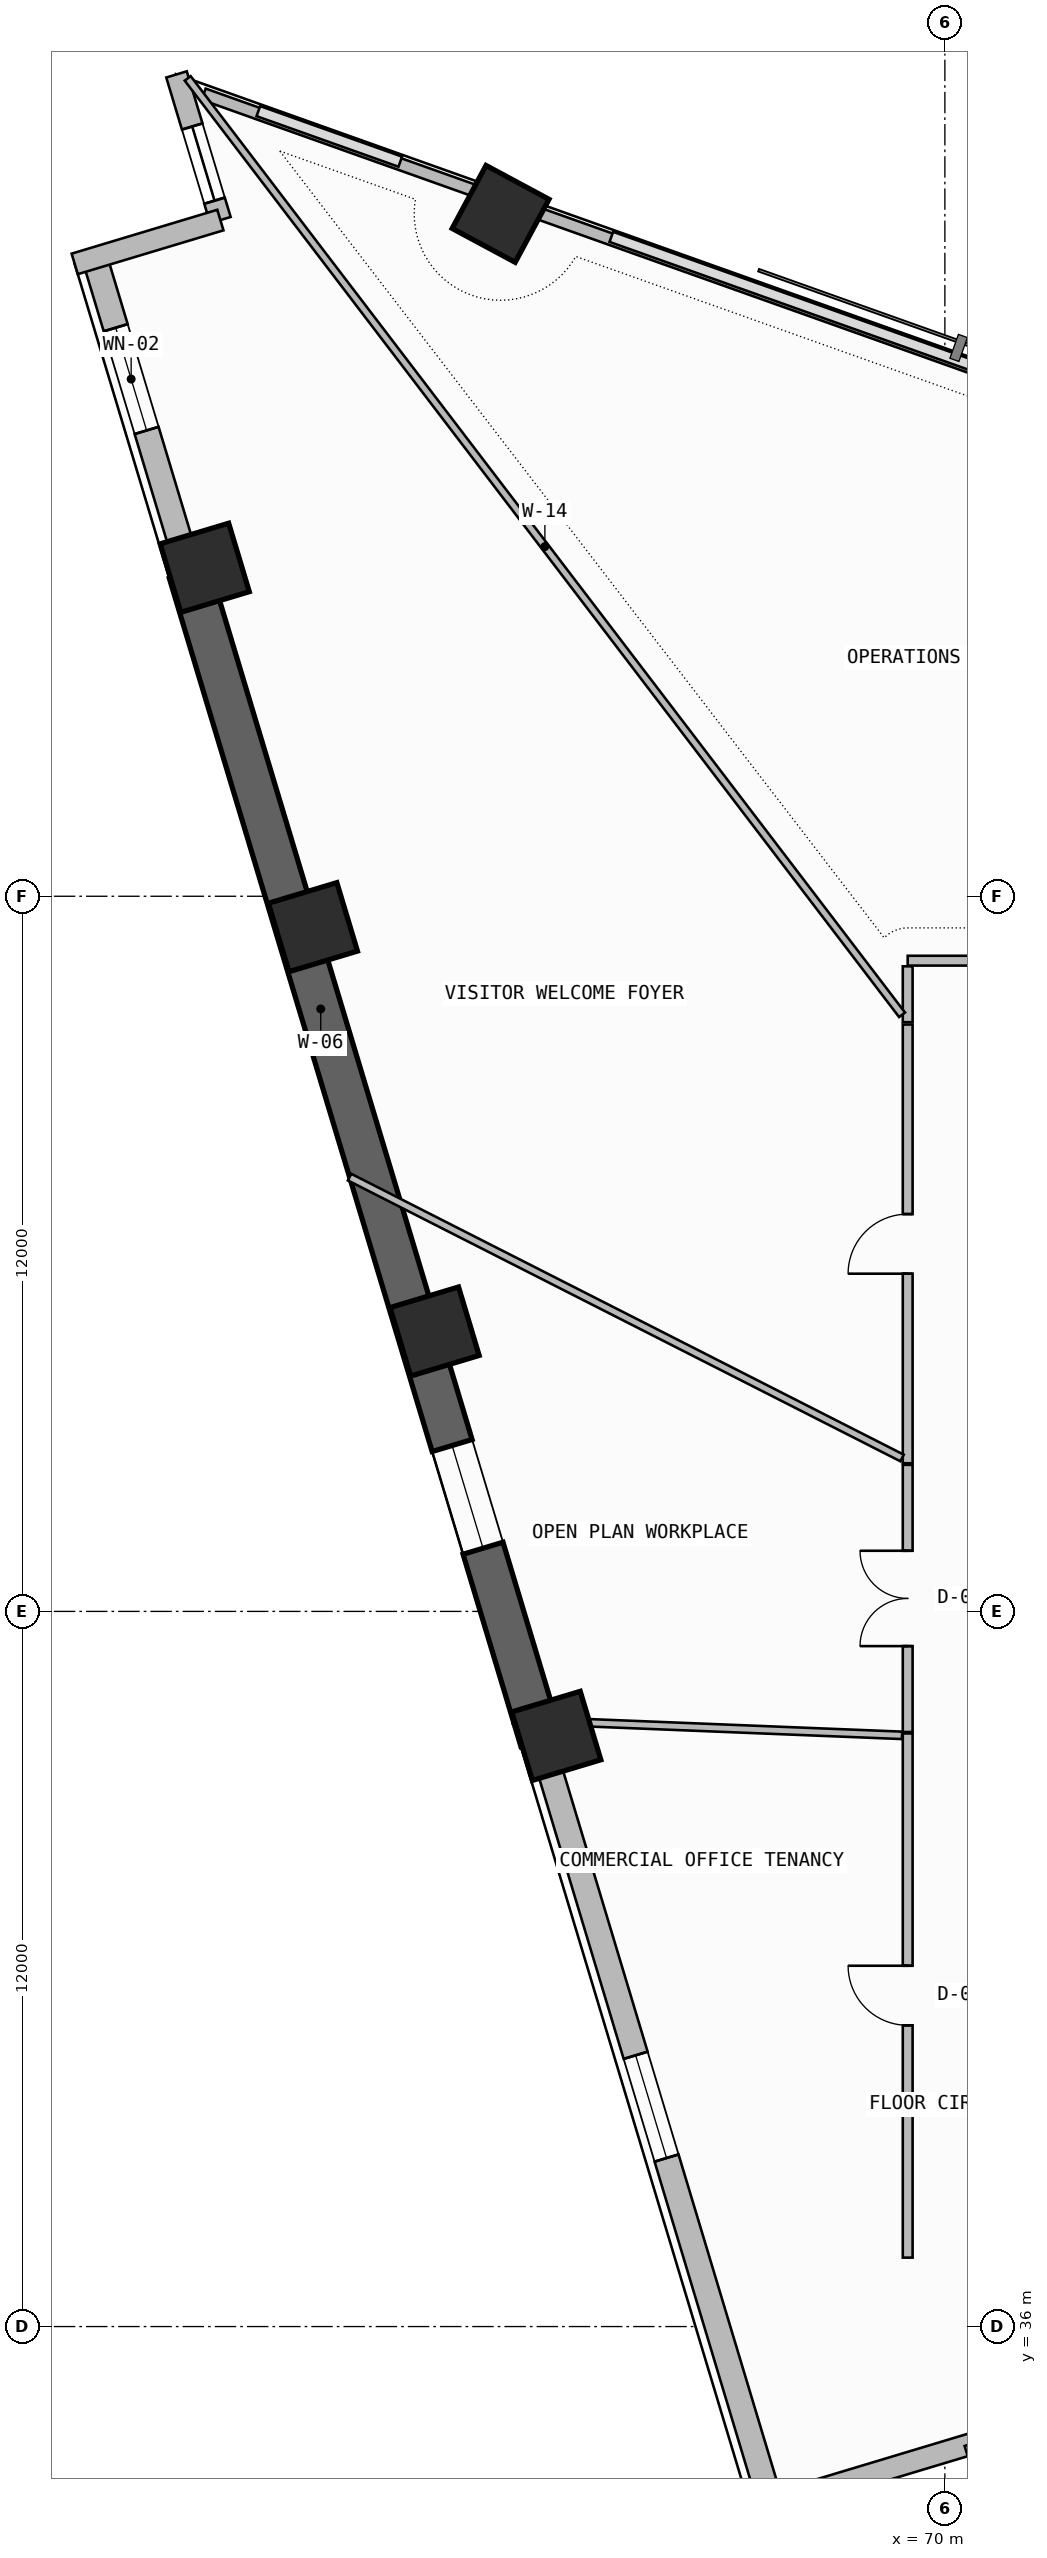
"""IFC4 building model, lengths in metres.
Left out: names, types, materials, properties, quantities, classifications, styles, units other than length and angle.
Written with IfcOpenShell. Run it as: python <this file> out.ifc"""

import sys

from ifc_helpers import new_model, si_unit, direction, frame, frame_2d, origin, origin_2d, place, context, subcontext, project, spatial, rectangle, extrude, element, fill, save


model = new_model("IFC4")
c1 = context("Model", 3, precision=1e-05, world=origin(), true_north=direction((0.0, 1.0)))
c2 = subcontext(c1, "Body", "Model", "MODEL_VIEW")
j1 = project(units=[si_unit("LENGTHUNIT", "METRE"), si_unit("PLANEANGLEUNIT", "RADIAN")], contexts=[c1])
p1 = place(None, origin())
s1 = spatial("IfcSite", under=j1, at=p1, CompositionType="ELEMENT")
p2 = place(p1, origin())
s2 = spatial("IfcBuilding", under=s1, at=p2, CompositionType="ELEMENT")
p3 = place(p2, frame((0.0, 0.0, 150.3)))
s3 = spatial("IfcBuildingStorey", under=s2, at=p3, CompositionType="ELEMENT", Elevation=150.3)
for number, where, z_axis, x_axis in (
    (1, (62.545, 71.45, 0.0), (0.0, 0.0, 1.0), (0.473, 0.881, 0.0)),
    (2, (57.581, 65.512, 0.0), (0.0, 0.0, 1.0), (-0.288, 0.958, 0.0)),
    (3, (59.396, 59.481, 0.0), (0.0, 0.0, 1.0), (-0.288, 0.958, 0.0)),
    (4, (61.438, 52.696, 0.0), (0.0, 0.0, 1.0), (-0.288, 0.958, 0.0)),
    (5, (63.48, 45.912, 0.0), (0.0, 0.0, 1.0), (-0.288, 0.958, 0.0)),
):
    element("IfcColumn", number, at=place(p3, frame(where, z_axis=z_axis, x_axis=x_axis)), inside=s3, PredefinedType="COLUMN", context=c2, shape_type="SweptSolid", body=[
        extrude(rectangle(XDim=1.2, YDim=1.2, at=origin_2d()), origin(), (0.0, 0.0, 1.0), 3.6),
    ])
p4 = place(p3, frame((55.734, 70.711, 0.0), z_axis=(0.0, 0.0, 1.0), x_axis=(0.288221590884, -0.957563739157, 0.0)))
e6 = element("IfcWall", 6, at=p4, inside=s3, PredefinedType="SOLIDWALL", context=c2, shape_type="SweptSolid", body=[
    extrude(rectangle(XDim=5.511, YDim=0.42, at=frame_2d((2.755, 0.0))), origin(), (0.0, 0.0, 1.0), 2.725),
])
p5 = place(p4, frame((1.223, 0.0, 1.2)))
e7 = element("IfcOpeningElement", 7, at=p5, cuts=e6, PredefinedType="OPENING", context=c2, shape_type="SweptSolid", body=[
    extrude(rectangle(XDim=1.8, YDim=0.9, at=frame_2d((0.9, 0.45))), frame((0.0, 0.22, 0.0), z_axis=(0.0, -1.0, 0.0), x_axis=(1.0, 0.0, 0.0)), (0.0, 0.0, 1.0), 0.44),
])
p6 = place(p3, frame((57.323, 65.434, -0.26), z_axis=(0.0, 0.0, 1.0), x_axis=(0.288188159352, -0.957573801234, 0.0)))
e8 = element("IfcWall", 8, at=p6, inside=s3, PredefinedType="SHEAR", context=c2, shape_type="SweptSolid", body=[
    extrude(rectangle(XDim=20.469, YDim=0.7, at=frame_2d((10.234, 0.0))), origin(), (0.0, 0.0, 1.0), 3.6),
])
p7 = place(p6, frame((15.3, 0.0, 1.2)))
e9 = element("IfcOpeningElement", 9, at=p7, cuts=e8, PredefinedType="OPENING", context=c2, shape_type="SweptSolid", body=[
    extrude(rectangle(XDim=1.8, YDim=0.9, at=frame_2d((0.9, 0.45))), frame((0.0, 0.36, 0.0), z_axis=(0.0, -1.0, 0.0), x_axis=(1.0, 0.0, 0.0)), (0.0, 0.0, 1.0), 0.72),
])
p8 = place(p3, frame((63.221, 45.834, 0.0), z_axis=(0.0, 0.0, 1.0), x_axis=(0.288202962273, -0.957569346072, 0.0)))
e10 = element("IfcWall", 10, at=p8, inside=s3, PredefinedType="SOLIDWALL", context=c2, shape_type="SweptSolid", body=[
    extrude(rectangle(XDim=13.384, YDim=0.42, at=frame_2d((6.692, 0.0))), origin(), (0.0, 0.0, 1.0), 2.725),
])
p9 = place(p8, frame((5.517, 0.0, 1.2)))
e11 = element("IfcOpeningElement", 11, at=p9, cuts=e10, PredefinedType="OPENING", context=c2, shape_type="SweptSolid", body=[
    extrude(rectangle(XDim=1.8, YDim=0.9, at=frame_2d((0.9, 0.45))), frame((0.0, 0.22, 0.0), z_axis=(0.0, -1.0, 0.0), x_axis=(1.0, 0.0, 0.0)), (0.0, 0.0, 1.0), 0.44),
])
p10 = place(p3, frame((57.108, 73.79, 0.0), z_axis=(0.0, 0.0, 1.0), x_axis=(0.288198985694, -0.957570542908, 0.0)))
e12 = element("IfcWall", 12, at=p10, inside=s3, PredefinedType="SOLIDWALL", context=c2, shape_type="SweptSolid", body=[
    extrude(rectangle(XDim=2.552, YDim=0.36, at=frame_2d((1.276, 0.0))), origin(), (0.0, 0.0, 1.0), 3.34),
])
p11 = place(p10, frame((0.913, 0.0, 0.45)))
e13 = element("IfcOpeningElement", 13, at=p11, cuts=e12, PredefinedType="OPENING", context=c2, shape_type="SweptSolid", body=[
    extrude(rectangle(XDim=1.3, YDim=2.4, at=frame_2d((0.65, 1.2))), frame((0.0, 0.19, 0.0), z_axis=(0.0, -1.0, 0.0), x_axis=(1.0, 0.0, 0.0)), (0.0, 0.0, 1.0), 0.38),
])
p12 = place(p3, frame((57.843, 71.346, 0.0), z_axis=(0.0, 0.0, 1.0), x_axis=(-0.95757848653, -0.288172590882, 0.0)))
e14 = element("IfcWall", 14, at=p12, inside=s3, PredefinedType="SOLIDWALL", context=c2, shape_type="SweptSolid", body=[
    extrude(rectangle(XDim=2.553, YDim=0.36, at=frame_2d((1.276, 0.0))), origin(), (0.0, 0.0, 1.0), 3.34),
])
p13 = place(p3, frame((66.743, 32.917, 0.0), z_axis=(0.0, 0.0, 1.0), x_axis=(0.957584687378, 0.288151985068, 0.0)))
e15 = element("IfcWall", 15, at=p13, inside=s3, PredefinedType="SOLIDWALL", context=c2, shape_type="SweptSolid", body=[
    extrude(rectangle(XDim=3.927, YDim=0.36, at=frame_2d((1.963, 0.0))), origin(), (0.0, 0.0, 1.0), 3.34),
])
p14 = place(p3, frame((70.504, 34.049, 0.0), z_axis=(0.0, 0.0, 1.0), x_axis=(0.288169140251, -0.957579524952, 0.0)))
e16 = element("IfcWall", 16, at=p14, inside=s3, PredefinedType="SOLIDWALL", context=c2, shape_type="SweptSolid", body=[
    extrude(rectangle(XDim=3.927, YDim=0.36, at=frame_2d((1.963, 0.0))), origin(), (0.0, 0.0, 1.0), 3.34),
])
p15 = place(p3, frame((89.368, 62.13, 0.0), z_axis=(0.0, 0.0, 1.0), x_axis=(-0.942033439765, 0.335518998515, 0.0)))
e17 = element("IfcWall", 17, at=p15, inside=s3, PredefinedType="PARAPET", context=c2, shape_type="SweptSolid", body=[
    extrude(rectangle(XDim=27.969, YDim=0.2, at=frame_2d((13.985, 0.0))), origin(), (0.0, 0.0, 1.0), 1.15),
])
p16 = place(p3, frame((62.218, 71.801, 0.0), z_axis=(0.0, 0.0, 1.0), x_axis=(-0.942038862895, 0.335503771655, 0.0)))
e18 = element("IfcWall", 18, at=p16, inside=s3, PredefinedType="PARAPET", context=c2, shape_type="SweptSolid", body=[
    extrude(rectangle(XDim=4.942, YDim=0.2, at=frame_2d((2.471, 0.0))), origin(), (0.0, 0.0, 1.0), 1.15),
])
p17 = place(p3, frame((69.376, 45.952, 0.0), z_axis=(0.0, 0.0, 1.0), x_axis=(0.0, -1.0, 0.0)))
e19 = element("IfcWall", 19, at=p17, inside=s3, PredefinedType="PARTITIONING", context=c2, shape_type="SweptSolid", body=[
    extrude(rectangle(XDim=8.796, YDim=0.165, at=frame_2d((4.398, 0.0))), origin(), (0.0, 0.0, 1.0), 3.34),
])
p18 = place(p17, frame((3.898, 0.0, 0.0)))
e20 = element("IfcOpeningElement", 20, at=p18, cuts=e19, PredefinedType="OPENING", context=c2, shape_type="SweptSolid", body=[
    extrude(rectangle(XDim=1.0, YDim=2.2, at=frame_2d((0.5, 1.1))), frame((0.0, 0.093, 0.0), z_axis=(0.0, -1.0, 0.0), x_axis=(1.0, 0.0, 0.0)), (0.0, 0.0, 1.0), 0.185),
])
p19 = place(p3, frame((62.751, 46.182, 0.0), z_axis=(0.0, 0.0, 1.0), x_axis=(0.99919498064, -0.040117211559, 0.0)))
e21 = element("IfcWall", 21, at=p19, inside=s3, PredefinedType="PARTITIONING", context=c2, shape_type="SweptSolid", body=[
    extrude(rectangle(XDim=6.536, YDim=0.125, at=frame_2d((3.268, 0.0))), origin(), (0.0, 0.0, 1.0), 2.725),
])
p20 = place(p3, frame((80.328, 58.919, 0.0), z_axis=(0.0, 0.0, 1.0), x_axis=(-1.0, 0.0, 0.0)))
e22 = element("IfcWall", 22, at=p20, inside=s3, PredefinedType="PARTITIONING", context=c2, shape_type="SweptSolid", body=[
    extrude(rectangle(XDim=10.952, YDim=0.165, at=frame_2d((5.476, 0.0))), origin(), (0.0, 0.0, 1.0), 2.725),
])
p21 = place(p20, frame((4.976, 0.0, 0.0)))
e23 = element("IfcOpeningElement", 23, at=p21, cuts=e22, PredefinedType="OPENING", context=c2, shape_type="SweptSolid", body=[
    extrude(rectangle(XDim=1.0, YDim=2.2, at=frame_2d((0.5, 1.1))), frame((0.0, 0.093, 0.0), z_axis=(0.0, -1.0, 0.0), x_axis=(1.0, 0.0, 0.0)), (0.0, 0.0, 1.0), 0.185),
])
p22 = place(p3, frame((69.376, 58.824, 0.0), z_axis=(0.0, 0.0, 1.0), x_axis=(0.0, -1.0, 0.0)))
e24 = element("IfcWall", 24, at=p22, inside=s3, PredefinedType="PARTITIONING", context=c2, shape_type="SweptSolid", body=[
    extrude(rectangle(XDim=0.938, YDim=0.165, at=frame_2d((0.469, 0.0))), origin(), (0.0, 0.0, 1.0), 2.725),
])
p23 = place(p3, frame((69.282, 58.011, 0.0), z_axis=(0.0, 0.0, 1.0), x_axis=(-0.606526214548, 0.795063488702, 0.0)))
e25 = element("IfcWall", 25, at=p23, inside=s3, PredefinedType="PARTITIONING", context=c2, shape_type="SweptSolid", body=[
    extrude(rectangle(XDim=19.763, YDim=0.125, at=frame_2d((9.882, 0.0))), origin(), (0.0, 0.0, 1.0), 2.725),
])
p24 = place(p3, frame((69.376, 57.847, 0.0), z_axis=(0.0, 0.0, 1.0), x_axis=(0.0, -1.0, 0.0)))
e26 = element("IfcWall", 26, at=p24, inside=s3, PredefinedType="PARTITIONING", context=c2, shape_type="SweptSolid", body=[
    extrude(rectangle(XDim=7.361, YDim=0.165, at=frame_2d((3.681, 0.0))), origin(), (0.0, 0.0, 1.0), 2.725),
])
p25 = place(p24, frame((3.181, 0.0, 0.0)))
e27 = element("IfcOpeningElement", 27, at=p25, cuts=e26, PredefinedType="OPENING", context=c2, shape_type="SweptSolid", body=[
    extrude(rectangle(XDim=1.0, YDim=2.2, at=frame_2d((0.5, 1.1))), frame((0.0, 0.093, 0.0), z_axis=(0.0, -1.0, 0.0), x_axis=(1.0, 0.0, 0.0)), (0.0, 0.0, 1.0), 0.185),
])
p26 = place(p3, frame((69.282, 50.574, 0.0), z_axis=(0.0, 0.0, 1.0), x_axis=(-0.891440261232, 0.453138235702, 0.0)))
e28 = element("IfcWall", 28, at=p26, inside=s3, PredefinedType="PARTITIONING", context=c2, shape_type="SweptSolid", body=[
    extrude(rectangle(XDim=10.4, YDim=0.125, at=frame_2d((5.2, 0.0))), origin(), (0.0, 0.0, 1.0), 2.725),
])
p27 = place(p3, frame((69.376, 50.459, 0.0), z_axis=(0.0, 0.0, 1.0), x_axis=(0.0, -1.0, 0.0)))
e29 = element("IfcWall", 29, at=p27, inside=s3, PredefinedType="PARTITIONING", context=c2, shape_type="SweptSolid", body=[
    extrude(rectangle(XDim=4.483, YDim=0.165, at=frame_2d((2.241, 0.0))), origin(), (0.0, 0.0, 1.0), 2.725),
])
p28 = place(p27, frame((1.441, 0.0, 0.0)))
e30 = element("IfcOpeningElement", 30, at=p28, cuts=e29, PredefinedType="OPENING", context=c2, shape_type="SweptSolid", body=[
    extrude(rectangle(XDim=1.6, YDim=2.3, at=frame_2d((0.8, 1.15))), frame((0.0, 0.093, 0.0), z_axis=(0.0, -1.0, 0.0), x_axis=(1.0, 0.0, 0.0)), (0.0, 0.0, 1.0), 0.185),
])
p29 = place(p5, origin())
e31 = element("IfcWindow", 31, at=p29, inside=s3, PartitioningType="SINGLE_PANEL", PredefinedType="WINDOW", context=c2, shape_type="SweptSolid", body=[
    extrude(rectangle(XDim=1.8, YDim=0.9, at=frame_2d((0.9, 0.45))), frame((0.0, 0.03, 0.0), z_axis=(0.0, -1.0, 0.0), x_axis=(1.0, 0.0, 0.0)), (0.0, 0.0, 1.0), 0.06),
])
fill(e7, e31)
p30 = place(p7, origin())
e32 = element("IfcWindow", 32, at=p30, inside=s3, PartitioningType="SINGLE_PANEL", PredefinedType="WINDOW", context=c2, shape_type="SweptSolid", body=[
    extrude(rectangle(XDim=1.8, YDim=0.9, at=frame_2d((0.9, 0.45))), frame((0.0, 0.03, 0.0), z_axis=(0.0, -1.0, 0.0), x_axis=(1.0, 0.0, 0.0)), (0.0, 0.0, 1.0), 0.06),
])
fill(e9, e32)
p31 = place(p9, origin())
e33 = element("IfcWindow", 33, at=p31, inside=s3, PartitioningType="SINGLE_PANEL", PredefinedType="WINDOW", context=c2, shape_type="SweptSolid", body=[
    extrude(rectangle(XDim=1.8, YDim=0.9, at=frame_2d((0.9, 0.45))), frame((0.0, 0.03, 0.0), z_axis=(0.0, -1.0, 0.0), x_axis=(1.0, 0.0, 0.0)), (0.0, 0.0, 1.0), 0.06),
])
fill(e11, e33)
p32 = place(p11, origin())
e34 = element("IfcWindow", 34, at=p32, inside=s3, PartitioningType="SINGLE_PANEL", PredefinedType="WINDOW", context=c2, shape_type="SweptSolid", body=[
    extrude(rectangle(XDim=1.3, YDim=2.4, at=frame_2d((0.65, 1.2))), frame((0.0, 0.03, 0.0), z_axis=(0.0, -1.0, 0.0), x_axis=(1.0, 0.0, 0.0)), (0.0, 0.0, 1.0), 0.06),
])
fill(e13, e34)
p33 = place(p18, frame((1.0, 0.0, 0.0), z_axis=(0.0, 0.0, 1.0), x_axis=(-1.0, 0.0, 0.0)))
e35 = element("IfcDoor", 35, at=p33, inside=s3, OperationType="SINGLE_SWING_RIGHT", PredefinedType="DOOR", context=c2, shape_type="SweptSolid", body=[
    extrude(rectangle(XDim=1.0, YDim=2.2, at=frame_2d((0.5, 1.1))), frame((0.0, 0.025, 0.0), z_axis=(0.0, -1.0, 0.0), x_axis=(1.0, 0.0, 0.0)), (0.0, 0.0, 1.0), 0.05),
])
fill(e20, e35)
p34 = place(p25, frame((1.0, 0.0, 0.0), z_axis=(0.0, 0.0, 1.0), x_axis=(-1.0, 0.0, 0.0)))
e36 = element("IfcDoor", 36, at=p34, inside=s3, OperationType="SINGLE_SWING_LEFT", PredefinedType="DOOR", context=c2, shape_type="SweptSolid", body=[
    extrude(rectangle(XDim=1.0, YDim=2.2, at=frame_2d((0.5, 1.1))), frame((0.0, 0.025, 0.0), z_axis=(0.0, -1.0, 0.0), x_axis=(1.0, 0.0, 0.0)), (0.0, 0.0, 1.0), 0.05),
])
fill(e27, e36)
p35 = place(p28, frame((1.6, 0.0, 0.0), z_axis=(0.0, 0.0, 1.0), x_axis=(-1.0, 0.0, 0.0)))
e37 = element("IfcDoor", 37, at=p35, inside=s3, OperationType="DOUBLE_DOOR_SINGLE_SWING", PredefinedType="DOOR", context=c2, shape_type="SweptSolid", body=[
    extrude(rectangle(XDim=1.6, YDim=2.3, at=frame_2d((0.8, 1.15))), frame((0.0, 0.025, 0.0), z_axis=(0.0, -1.0, 0.0), x_axis=(1.0, 0.0, 0.0)), (0.0, 0.0, 1.0), 0.05),
])
fill(e30, e37)
save(model, sys.argv[1])
